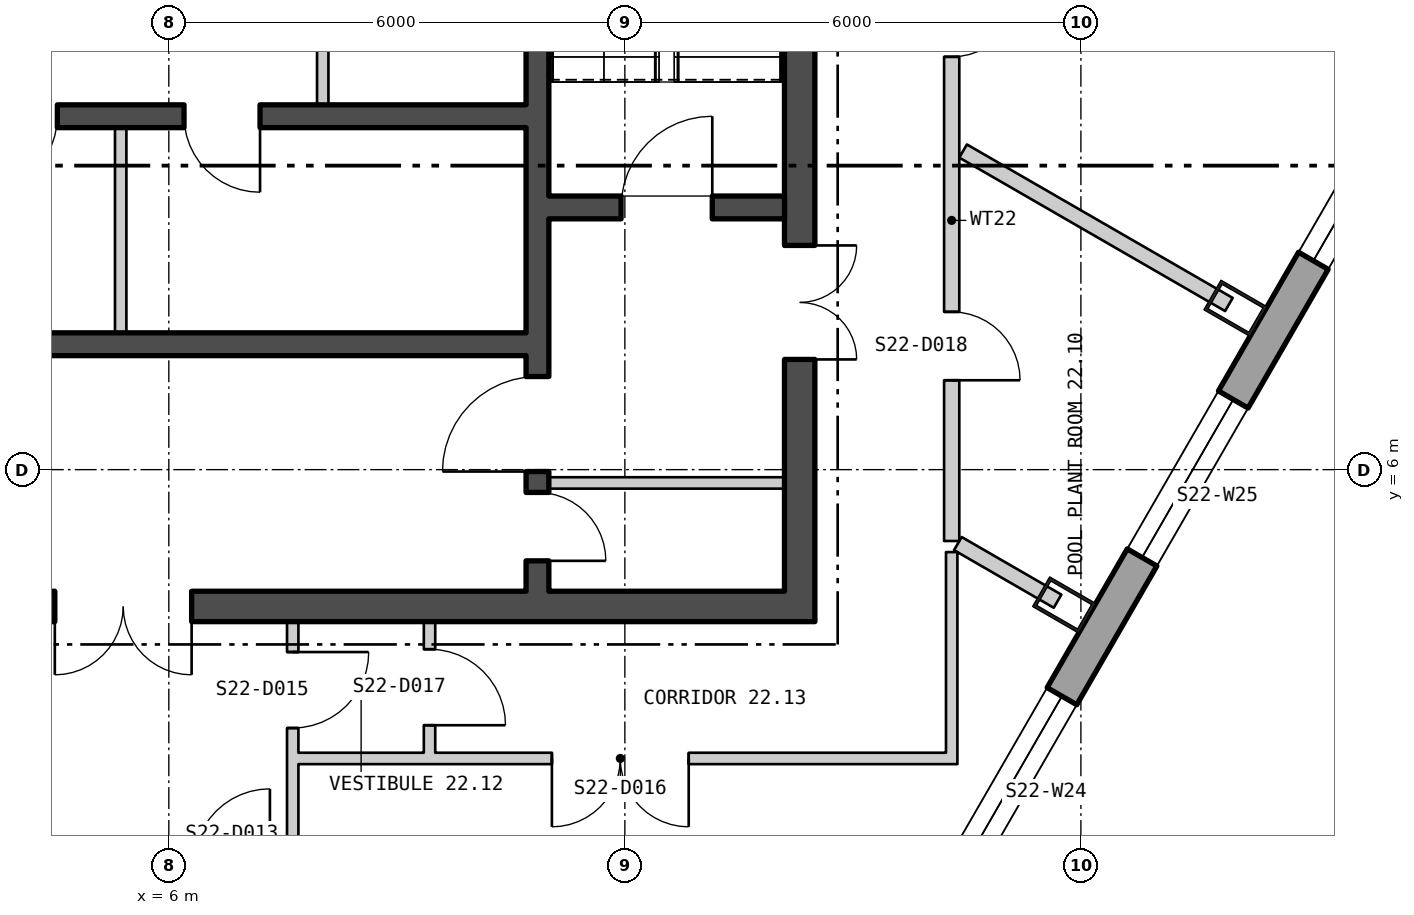
"""IFC4 building model, lengths in metres.
Left out: names, types, materials, properties, quantities, classifications, styles, units other than length and angle.
Written with IfcOpenShell. Run it as: python <this file> out.ifc"""

import sys

from ifc_helpers import new_model, si_unit, direction, frame, frame_2d, origin, origin_2d, place, context, subcontext, project, spatial, polyline, rectangle, hollow_rectangle, outline, extrude, element, fill, save


model = new_model("IFC4")
c1 = context("Model", 3, precision=1e-05, world=origin(), true_north=direction((0.0, 1.0)))
c2 = subcontext(c1, "Body", "Model", "MODEL_VIEW")
j1 = project(units=[si_unit("LENGTHUNIT", "METRE"), si_unit("PLANEANGLEUNIT", "RADIAN")], contexts=[c1])
p1 = place(None, origin())
s1 = spatial("IfcSite", under=j1, at=p1, CompositionType="ELEMENT")
p2 = place(p1, origin())
s2 = spatial("IfcBuilding", under=s1, at=p2, CompositionType="ELEMENT")
p3 = place(p2, frame((0.0, 0.0, 298.2)))
s3 = spatial("IfcBuildingStorey", under=s2, at=p3, CompositionType="ELEMENT", Elevation=298.2)
for number, where, z_axis, x_axis in (
    (1, (17.78, 4.219, 0.0), (0.0, 0.0, 1.0), (0.5, 0.866, 0.0)),
    (2, (20.034, 8.123, 0.0), (0.0, 0.0, 1.0), (0.5, 0.866, 0.0)),
):
    element("IfcColumn", number, at=place(p3, frame(where, z_axis=z_axis, x_axis=x_axis)), inside=s3, PredefinedType="COLUMN", context=c2, shape_type="SweptSolid", body=[
        extrude(hollow_rectangle(XDim=0.45, YDim=0.7, WallThickness=0.04, at=origin_2d()), origin(), (0.0, 0.0, 1.0), 6.0),
    ])
p4 = place(p3, frame((2.335, -23.682, -0.28), z_axis=(0.0, 0.0, 1.0), x_axis=(0.499999764979, 0.866025539474, 0.0)))
e3 = element("IfcWall", 3, at=p4, inside=s3, PredefinedType="SOLIDWALL", context=c2, shape_type="SweptSolid", body=[
    extrude(outline(polyline([(-0.13, -0.225), (45.87, -0.225), (45.61, 0.225), (0.13, 0.225), (-0.13, -0.225)])), origin(), (0.0, 0.0, 1.0), 6.1),
])
p5 = place(p4, frame((1.424, 0.0, 1.18)))
e4 = element("IfcOpeningElement", 4, at=p5, cuts=e3, PredefinedType="OPENING", context=c2, shape_type="SweptSolid", body=[
    extrude(rectangle(XDim=2.4, YDim=4.1, at=frame_2d((1.2, 2.05))), frame((0.0, 0.235, 0.0), z_axis=(0.0, -1.0, 0.0), x_axis=(1.0, 0.0, 0.0)), (0.0, 0.0, 1.0), 0.47),
])
p6 = place(p4, frame((5.893, 0.0, 1.18)))
e5 = element("IfcOpeningElement", 5, at=p6, cuts=e3, PredefinedType="OPENING", context=c2, shape_type="SweptSolid", body=[
    extrude(rectangle(XDim=2.4, YDim=4.1, at=frame_2d((1.2, 2.05))), frame((0.0, 0.235, 0.0), z_axis=(0.0, -1.0, 0.0), x_axis=(1.0, 0.0, 0.0)), (0.0, 0.0, 1.0), 0.47),
])
p7 = place(p4, frame((10.401, 0.0, 1.18)))
e6 = element("IfcOpeningElement", 6, at=p7, cuts=e3, PredefinedType="OPENING", context=c2, shape_type="SweptSolid", body=[
    extrude(rectangle(XDim=2.4, YDim=4.1, at=frame_2d((1.2, 2.05))), frame((0.0, 0.235, 0.0), z_axis=(0.0, -1.0, 0.0), x_axis=(1.0, 0.0, 0.0)), (0.0, 0.0, 1.0), 0.47),
])
p8 = place(p4, frame((14.909, 0.0, 1.18)))
e7 = element("IfcOpeningElement", 7, at=p8, cuts=e3, PredefinedType="OPENING", context=c2, shape_type="SweptSolid", body=[
    extrude(rectangle(XDim=2.4, YDim=4.1, at=frame_2d((1.2, 2.05))), frame((0.0, 0.235, 0.0), z_axis=(0.0, -1.0, 0.0), x_axis=(1.0, 0.0, 0.0)), (0.0, 0.0, 1.0), 0.47),
])
p9 = place(p4, frame((19.716, 0.0, 0.28)))
e8 = element("IfcOpeningElement", 8, at=p9, cuts=e3, PredefinedType="OPENING", context=c2, shape_type="SweptSolid", body=[
    extrude(rectangle(XDim=1.8, YDim=2.4, at=frame_2d((0.9, 1.2))), frame((0.0, 0.235, 0.0), z_axis=(0.0, -1.0, 0.0), x_axis=(1.0, 0.0, 0.0)), (0.0, 0.0, 1.0), 0.47),
])
p10 = place(p4, frame((24.224, 0.0, 0.28)))
e9 = element("IfcOpeningElement", 9, at=p10, cuts=e3, PredefinedType="OPENING", context=c2, shape_type="SweptSolid", body=[
    extrude(rectangle(XDim=1.8, YDim=2.4, at=frame_2d((0.9, 1.2))), frame((0.0, 0.235, 0.0), z_axis=(0.0, -1.0, 0.0), x_axis=(1.0, 0.0, 0.0)), (0.0, 0.0, 1.0), 0.47),
])
p11 = place(p4, frame((28.431, 0.0, 1.18)))
e10 = element("IfcOpeningElement", 10, at=p11, cuts=e3, PredefinedType="OPENING", context=c2, shape_type="SweptSolid", body=[
    extrude(rectangle(XDim=2.4, YDim=4.1, at=frame_2d((1.2, 2.05))), frame((0.0, 0.235, 0.0), z_axis=(0.0, -1.0, 0.0), x_axis=(1.0, 0.0, 0.0)), (0.0, 0.0, 1.0), 0.47),
])
p12 = place(p4, frame((32.939, 0.0, 1.18)))
e11 = element("IfcOpeningElement", 11, at=p12, cuts=e3, PredefinedType="OPENING", context=c2, shape_type="SweptSolid", body=[
    extrude(rectangle(XDim=2.4, YDim=4.1, at=frame_2d((1.2, 2.05))), frame((0.0, 0.235, 0.0), z_axis=(0.0, -1.0, 0.0), x_axis=(1.0, 0.0, 0.0)), (0.0, 0.0, 1.0), 0.47),
])
p13 = place(p4, frame((37.447, 0.0, 1.18)))
e12 = element("IfcOpeningElement", 12, at=p13, cuts=e3, PredefinedType="OPENING", context=c2, shape_type="SweptSolid", body=[
    extrude(rectangle(XDim=2.4, YDim=4.1, at=frame_2d((1.2, 2.05))), frame((0.0, 0.235, 0.0), z_axis=(0.0, -1.0, 0.0), x_axis=(1.0, 0.0, 0.0)), (0.0, 0.0, 1.0), 0.47),
])
p14 = place(p4, frame((41.916, 0.0, 1.18)))
e13 = element("IfcOpeningElement", 13, at=p14, cuts=e3, PredefinedType="OPENING", context=c2, shape_type="SweptSolid", body=[
    extrude(rectangle(XDim=2.4, YDim=4.1, at=frame_2d((1.2, 2.05))), frame((0.0, 0.235, 0.0), z_axis=(0.0, -1.0, 0.0), x_axis=(1.0, 0.0, 0.0)), (0.0, 0.0, 1.0), 0.47),
])
p15 = place(p3, frame((-14.5, 4.2, 0.0), z_axis=(0.0, 0.0, 1.0), x_axis=(1.0, 0.0, 0.0)))
e14 = element("IfcWall", 14, at=p15, inside=s3, PredefinedType="SHEAR", context=c2, shape_type="SweptSolid", body=[
    extrude(rectangle(XDim=29.0, YDim=0.4, at=frame_2d((14.5, 0.0))), origin(), (0.0, 0.0, 1.0), 5.8),
])
p16 = place(p15, frame((9.0, 0.0, 0.0)))
e15 = element("IfcOpeningElement", 15, at=p16, cuts=e14, PredefinedType="OPENING", context=c2, shape_type="SweptSolid", body=[
    extrude(rectangle(XDim=1.8, YDim=2.4, at=frame_2d((0.9, 1.2))), frame((0.0, 0.21, 0.0), z_axis=(0.0, -1.0, 0.0), x_axis=(1.0, 0.0, 0.0)), (0.0, 0.0, 1.0), 0.42),
])
p17 = place(p15, frame((19.0, 0.0, 0.0)))
e16 = element("IfcOpeningElement", 16, at=p17, cuts=e14, PredefinedType="OPENING", context=c2, shape_type="SweptSolid", body=[
    extrude(rectangle(XDim=1.8, YDim=2.4, at=frame_2d((0.9, 1.2))), frame((0.0, 0.21, 0.0), z_axis=(0.0, -1.0, 0.0), x_axis=(1.0, 0.0, 0.0)), (0.0, 0.0, 1.0), 0.42),
])
p18 = place(p3, frame((14.3, 4.4, 0.0), z_axis=(0.0, 0.0, 1.0), x_axis=(0.0, 1.0, 0.0)))
e17 = element("IfcWall", 17, at=p18, inside=s3, PredefinedType="SHEAR", context=c2, shape_type="SweptSolid", body=[
    extrude(rectangle(XDim=13.2, YDim=0.4, at=frame_2d((6.6, 0.0))), origin(), (0.0, 0.0, 1.0), 5.8),
])
p19 = place(p18, frame((3.05, 0.0, 0.0)))
e18 = element("IfcOpeningElement", 18, at=p19, cuts=e17, PredefinedType="OPENING", context=c2, shape_type="SweptSolid", body=[
    extrude(rectangle(XDim=1.5, YDim=2.1, at=frame_2d((0.75, 1.05))), frame((0.0, 0.21, 0.0), z_axis=(0.0, -1.0, 0.0), x_axis=(1.0, 0.0, 0.0)), (0.0, 0.0, 1.0), 0.42),
])
p20 = place(p3, frame((10.85, 4.4, 0.0), z_axis=(0.0, 0.0, 1.0), x_axis=(0.0, 1.0, 0.0)))
e19 = element("IfcWall", 19, at=p20, inside=s3, PredefinedType="SHEAR", context=c2, shape_type="SweptSolid", body=[
    extrude(rectangle(XDim=13.2, YDim=0.3, at=frame_2d((6.6, 0.0))), origin(), (0.0, 0.0, 1.0), 5.8),
])
p21 = place(p20, frame((1.575, 0.0, 0.0)))
e20 = element("IfcOpeningElement", 20, at=p21, cuts=e19, PredefinedType="OPENING", context=c2, shape_type="SweptSolid", body=[
    extrude(rectangle(XDim=1.25, YDim=2.1, at=frame_2d((0.625, 1.05))), frame((0.0, 0.16, 0.0), z_axis=(0.0, -1.0, 0.0), x_axis=(1.0, 0.0, 0.0)), (0.0, 0.0, 1.0), 0.32),
])
p22 = place(p20, frame((0.4, 0.0, 0.0)))
e21 = element("IfcOpeningElement", 21, at=p22, cuts=e19, PredefinedType="OPENING", context=c2, shape_type="SweptSolid", body=[
    extrude(rectangle(XDim=0.9, YDim=2.1, at=frame_2d((0.45, 1.05))), frame((0.0, 0.16, 0.0), z_axis=(0.0, -1.0, 0.0), x_axis=(1.0, 0.0, 0.0)), (0.0, 0.0, 1.0), 0.32),
])
p23 = place(p3, frame((11.0, 9.45, 0.0), z_axis=(0.0, 0.0, 1.0), x_axis=(1.0, 0.0, 0.0)))
e22 = element("IfcWall", 22, at=p23, inside=s3, PredefinedType="SHEAR", context=c2, shape_type="SweptSolid", body=[
    extrude(rectangle(XDim=3.1, YDim=0.3, at=frame_2d((1.55, 0.0))), origin(), (0.0, 0.0, 1.0), 5.8),
])
p24 = place(p23, frame((0.95, 0.0, 0.0)))
e23 = element("IfcOpeningElement", 23, at=p24, cuts=e22, PredefinedType="OPENING", context=c2, shape_type="SweptSolid", body=[
    extrude(rectangle(XDim=1.2, YDim=2.1, at=frame_2d((0.6, 1.05))), frame((0.0, 0.16, 0.0), z_axis=(0.0, -1.0, 0.0), x_axis=(1.0, 0.0, 0.0)), (0.0, 0.0, 1.0), 0.32),
])
p25 = place(p3, frame((2.6, 10.65, 0.0), z_axis=(0.0, 0.0, 1.0), x_axis=(1.0, 0.0, 0.0)))
e24 = element("IfcWall", 24, at=p25, inside=s3, PredefinedType="SHEAR", context=c2, shape_type="SweptSolid", body=[
    extrude(rectangle(XDim=8.1, YDim=0.3, at=frame_2d((4.05, 0.0))), origin(), (0.0, 0.0, 1.0), 5.8),
])
p26 = place(p25, frame((0.933, 0.0, 0.0)))
e25 = element("IfcOpeningElement", 25, at=p26, cuts=e24, PredefinedType="OPENING", context=c2, shape_type="SweptSolid", body=[
    extrude(rectangle(XDim=1.0, YDim=2.1, at=frame_2d((0.5, 1.05))), frame((0.0, 0.16, 0.0), z_axis=(0.0, -1.0, 0.0), x_axis=(1.0, 0.0, 0.0)), (0.0, 0.0, 1.0), 0.32),
])
p27 = place(p25, frame((3.6, 0.0, 0.0)))
e26 = element("IfcOpeningElement", 26, at=p27, cuts=e24, PredefinedType="OPENING", context=c2, shape_type="SweptSolid", body=[
    extrude(rectangle(XDim=1.0, YDim=2.1, at=frame_2d((0.5, 1.05))), frame((0.0, 0.16, 0.0), z_axis=(0.0, -1.0, 0.0), x_axis=(1.0, 0.0, 0.0)), (0.0, 0.0, 1.0), 0.32),
])
p28 = place(p3, frame((2.6, 7.65, 0.0), z_axis=(0.0, 0.0, 1.0), x_axis=(1.0, 0.0, 0.0)))
e27 = element("IfcWall", 27, at=p28, inside=s3, PredefinedType="SHEAR", context=c2, shape_type="SweptSolid", body=[
    extrude(rectangle(XDim=8.1, YDim=0.3, at=frame_2d((4.05, 0.0))), origin(), (0.0, 0.0, 1.0), 5.8),
])
p29 = place(p3, frame((5.367, 7.8, 0.0), z_axis=(0.0, 0.0, 1.0), x_axis=(0.0, 1.0, 0.0)))
e28 = element("IfcWall", 28, at=p29, inside=s3, PredefinedType="PARTITIONING", context=c2, shape_type="SweptSolid", body=[
    extrude(rectangle(XDim=2.7, YDim=0.15, at=frame_2d((1.35, 0.0))), origin(), (0.0, 0.0, 1.0), 5.8),
])
p30 = place(p3, frame((8.025, 10.8, 0.0), z_axis=(0.0, 0.0, 1.0), x_axis=(0.0, 1.0, 0.0)))
e29 = element("IfcWall", 29, at=p30, inside=s3, PredefinedType="PARTITIONING", context=c2, shape_type="SweptSolid", body=[
    extrude(rectangle(XDim=3.6, YDim=0.15, at=frame_2d((1.8, 0.0))), origin(), (0.0, 0.0, 1.0), 5.8),
])
p31 = place(p30, frame((1.175, 0.0, 0.0)))
e30 = element("IfcOpeningElement", 30, at=p31, cuts=e29, PredefinedType="OPENING", context=c2, shape_type="SweptSolid", body=[
    extrude(rectangle(XDim=1.25, YDim=2.1, at=frame_2d((0.625, 1.05))), frame((0.0, 0.085, 0.0), z_axis=(0.0, -1.0, 0.0), x_axis=(1.0, 0.0, 0.0)), (0.0, 0.0, 1.0), 0.17),
])
p32 = place(p3, frame((11.0, 5.825, 0.0), z_axis=(0.0, 0.0, 1.0), x_axis=(1.0, 0.0, 0.0)))
e31 = element("IfcWall", 31, at=p32, inside=s3, PredefinedType="PARTITIONING", context=c2, shape_type="SweptSolid", body=[
    extrude(rectangle(XDim=3.1, YDim=0.15, at=frame_2d((1.55, 0.0))), origin(), (0.0, 0.0, 1.0), 5.8),
])
p33 = place(p3, frame((7.63, -13.675, 0.0), z_axis=(0.0, 0.0, 1.0), x_axis=(0.0, 1.0, 0.0)))
e32 = element("IfcWall", 32, at=p33, inside=s3, PredefinedType="PARTITIONING", context=c2, shape_type="SweptSolid", body=[
    extrude(rectangle(XDim=17.675, YDim=0.15, at=frame_2d((8.838, 0.0))), origin(), (0.0, 0.0, 1.0), 5.8),
])
p34 = place(p33, frame((2.829, 0.0, 0.0)))
e33 = element("IfcOpeningElement", 33, at=p34, cuts=e32, PredefinedType="OPENING", context=c2, shape_type="SweptSolid", body=[
    extrude(rectangle(XDim=1.8, YDim=2.1, at=frame_2d((0.9, 1.05))), frame((0.0, 0.085, 0.0), z_axis=(0.0, -1.0, 0.0), x_axis=(1.0, 0.0, 0.0)), (0.0, 0.0, 1.0), 0.17),
])
p35 = place(p33, frame((16.275, 0.0, 0.0)))
e34 = element("IfcOpeningElement", 34, at=p35, cuts=e32, PredefinedType="OPENING", context=c2, shape_type="SweptSolid", body=[
    extrude(rectangle(XDim=1.0, YDim=2.1, at=frame_2d((0.5, 1.05))), frame((0.0, 0.085, 0.0), z_axis=(0.0, -1.0, 0.0), x_axis=(1.0, 0.0, 0.0)), (0.0, 0.0, 1.0), 0.17),
])
p36 = place(p3, frame((7.705, 2.2, 0.0), z_axis=(0.0, 0.0, 1.0), x_axis=(1.0, 0.0, 0.0)))
e35 = element("IfcWall", 35, at=p36, inside=s3, PredefinedType="PARTITIONING", context=c2, shape_type="SweptSolid", body=[
    extrude(rectangle(XDim=8.67, YDim=0.15, at=frame_2d((4.335, 0.0))), origin(), (0.0, 0.0, 1.0), 5.8),
])
p37 = place(p36, frame((3.335, 0.0, 0.0)))
e36 = element("IfcOpeningElement", 36, at=p37, cuts=e35, PredefinedType="OPENING", context=c2, shape_type="SweptSolid", body=[
    extrude(rectangle(XDim=1.8, YDim=2.1, at=frame_2d((0.9, 1.05))), frame((0.0, 0.085, 0.0), z_axis=(0.0, -1.0, 0.0), x_axis=(1.0, 0.0, 0.0)), (0.0, 0.0, 1.0), 0.17),
])
p38 = place(p3, frame((9.43, 2.275, 0.0), z_axis=(0.0, 0.0, 1.0), x_axis=(0.0, 1.0, 0.0)))
e37 = element("IfcWall", 37, at=p38, inside=s3, PredefinedType="PARTITIONING", context=c2, shape_type="SweptSolid", body=[
    extrude(rectangle(XDim=1.725, YDim=0.15, at=frame_2d((0.863, 0.0))), origin(), (0.0, 0.0, 1.0), 5.8),
])
p39 = place(p38, frame((0.362, 0.0, 0.0)))
e38 = element("IfcOpeningElement", 38, at=p39, cuts=e37, PredefinedType="OPENING", context=c2, shape_type="SweptSolid", body=[
    extrude(rectangle(XDim=1.0, YDim=2.1, at=frame_2d((0.5, 1.05))), frame((0.0, 0.085, 0.0), z_axis=(0.0, -1.0, 0.0), x_axis=(1.0, 0.0, 0.0)), (0.0, 0.0, 1.0), 0.17),
])
p40 = place(p3, frame((16.3, 2.275, 0.0), z_axis=(0.0, 0.0, 1.0), x_axis=(0.0, 1.0, 0.0)))
e39 = element("IfcWall", 39, at=p40, inside=s3, PredefinedType="PARTITIONING", context=c2, shape_type="SweptSolid", body=[
    extrude(rectangle(XDim=2.64, YDim=0.15, at=frame_2d((1.32, 0.0))), origin(), (0.0, 0.0, 1.0), 5.8),
])
p41 = place(p3, frame((16.3, 5.061, 0.0), z_axis=(0.0, 0.0, 1.0), x_axis=(0.0, 1.0, 0.0)))
e40 = element("IfcWall", 40, at=p41, inside=s3, PredefinedType="PARTITIONING", context=c2, shape_type="SweptSolid", body=[
    extrude(rectangle(XDim=8.437, YDim=0.2, at=frame_2d((4.218, 0.0))), origin(), (0.0, 0.0, 1.0), 5.8),
])
p42 = place(p41, frame((2.115, 0.0, 0.0)))
e41 = element("IfcOpeningElement", 41, at=p42, cuts=e40, PredefinedType="OPENING", context=c2, shape_type="SweptSolid", body=[
    extrude(rectangle(XDim=0.9, YDim=2.1, at=frame_2d((0.45, 1.05))), frame((0.0, 0.11, 0.0), z_axis=(0.0, -1.0, 0.0), x_axis=(1.0, 0.0, 0.0)), (0.0, 0.0, 1.0), 0.22),
])
p43 = place(p41, frame((6.371, 0.0, 0.0)))
e42 = element("IfcOpeningElement", 42, at=p43, cuts=e40, PredefinedType="OPENING", context=c2, shape_type="SweptSolid", body=[
    extrude(rectangle(XDim=0.9, YDim=2.1, at=frame_2d((0.45, 1.05))), frame((0.0, 0.11, 0.0), z_axis=(0.0, -1.0, 0.0), x_axis=(1.0, 0.0, 0.0)), (0.0, 0.0, 1.0), 0.22),
])
p44 = place(p3, frame((16.381, 5.027, 0.0), z_axis=(0.0, 0.0, 1.0), x_axis=(0.865877778751, -0.500255606931, 0.0)))
e43 = element("IfcWall", 43, at=p44, inside=s3, PredefinedType="PARTITIONING", context=c2, shape_type="SweptSolid", body=[
    extrude(rectangle(XDim=1.515, YDim=0.2, at=frame_2d((0.758, 0.0))), origin(), (0.0, 0.0, 1.0), 5.8),
])
p45 = place(p3, frame((16.45, 10.192, 0.0), z_axis=(0.0, 0.0, 1.0), x_axis=(0.866024748725, -0.500001134594, 0.0)))
e44 = element("IfcWall", 44, at=p45, inside=s3, PredefinedType="PARTITIONING", context=c2, shape_type="SweptSolid", body=[
    extrude(rectangle(XDim=4.038, YDim=0.2, at=frame_2d((2.019, 0.0))), origin(), (0.0, 0.0, 1.0), 5.8),
])
p46 = place(p11, origin())
e45 = element("IfcWindow", 45, at=p46, inside=s3, PartitioningType="SINGLE_PANEL", PredefinedType="WINDOW", context=c2, shape_type="SweptSolid", body=[
    extrude(rectangle(XDim=2.4, YDim=4.1, at=frame_2d((1.2, 2.05))), frame((0.0, 0.105, 0.0), z_axis=(0.0, -1.0, 0.0), x_axis=(1.0, 0.0, 0.0)), (0.0, 0.0, 1.0), 0.06),
])
fill(e10, e45)
p47 = place(p12, origin())
e46 = element("IfcWindow", 46, at=p47, inside=s3, PartitioningType="SINGLE_PANEL", PredefinedType="WINDOW", context=c2, shape_type="SweptSolid", body=[
    extrude(rectangle(XDim=2.4, YDim=4.1, at=frame_2d((1.2, 2.05))), frame((0.0, 0.105, 0.0), z_axis=(0.0, -1.0, 0.0), x_axis=(1.0, 0.0, 0.0)), (0.0, 0.0, 1.0), 0.06),
])
fill(e11, e46)
p48 = place(p13, origin())
e47 = element("IfcWindow", 47, at=p48, inside=s3, PartitioningType="SINGLE_PANEL", PredefinedType="WINDOW", context=c2, shape_type="SweptSolid", body=[
    extrude(rectangle(XDim=2.4, YDim=4.1, at=frame_2d((1.2, 2.05))), frame((0.0, 0.105, 0.0), z_axis=(0.0, -1.0, 0.0), x_axis=(1.0, 0.0, 0.0)), (0.0, 0.0, 1.0), 0.06),
])
fill(e12, e47)
p49 = place(p26, origin())
e48 = element("IfcDoor", 48, at=p49, inside=s3, OperationType="SINGLE_SWING_LEFT", PredefinedType="DOOR", context=c2, shape_type="SweptSolid", body=[
    extrude(rectangle(XDim=1.0, YDim=2.1, at=frame_2d((0.5, 1.05))), frame((0.0, 0.025, 0.0), z_axis=(0.0, -1.0, 0.0), x_axis=(1.0, 0.0, 0.0)), (0.0, 0.0, 1.0), 0.05),
])
fill(e25, e48)
p50 = place(p27, origin())
e49 = element("IfcDoor", 49, at=p50, inside=s3, OperationType="SINGLE_SWING_RIGHT", PredefinedType="DOOR", context=c2, shape_type="SweptSolid", body=[
    extrude(rectangle(XDim=1.0, YDim=2.1, at=frame_2d((0.5, 1.05))), frame((0.0, 0.025, 0.0), z_axis=(0.0, -1.0, 0.0), x_axis=(1.0, 0.0, 0.0)), (0.0, 0.0, 1.0), 0.05),
])
fill(e26, e49)
p51 = place(p24, origin())
e50 = element("IfcDoor", 50, at=p51, inside=s3, OperationType="SINGLE_SWING_LEFT", PredefinedType="DOOR", context=c2, shape_type="SweptSolid", body=[
    extrude(rectangle(XDim=1.2, YDim=2.1, at=frame_2d((0.6, 1.05))), frame((0.0, 0.025, 0.0), z_axis=(0.0, -1.0, 0.0), x_axis=(1.0, 0.0, 0.0)), (0.0, 0.0, 1.0), 0.05),
])
fill(e23, e50)
p52 = place(p21, origin())
e51 = element("IfcDoor", 51, at=p52, inside=s3, OperationType="SINGLE_SWING_RIGHT", PredefinedType="DOOR", context=c2, shape_type="SweptSolid", body=[
    extrude(rectangle(XDim=1.25, YDim=2.1, at=frame_2d((0.625, 1.05))), frame((0.0, 0.025, 0.0), z_axis=(0.0, -1.0, 0.0), x_axis=(1.0, 0.0, 0.0)), (0.0, 0.0, 1.0), 0.05),
])
fill(e20, e51)
p53 = place(p19, origin())
e52 = element("IfcDoor", 52, at=p53, inside=s3, OperationType="DOUBLE_DOOR_SINGLE_SWING", PredefinedType="DOOR", context=c2, shape_type="SweptSolid", body=[
    extrude(rectangle(XDim=1.5, YDim=2.1, at=frame_2d((0.75, 1.05))), frame((0.0, 0.025, 0.0), z_axis=(0.0, -1.0, 0.0), x_axis=(1.0, 0.0, 0.0)), (0.0, 0.0, 1.0), 0.05),
])
fill(e18, e52)
p54 = place(p22, origin())
e53 = element("IfcDoor", 53, at=p54, inside=s3, OperationType="SINGLE_SWING_LEFT", PredefinedType="DOOR", context=c2, shape_type="SweptSolid", body=[
    extrude(rectangle(XDim=0.9, YDim=2.1, at=frame_2d((0.45, 1.05))), frame((0.0, 0.025, 0.0), z_axis=(0.0, -1.0, 0.0), x_axis=(1.0, 0.0, 0.0)), (0.0, 0.0, 1.0), 0.05),
])
fill(e21, e53)
p55 = place(p17, origin())
e54 = element("IfcDoor", 54, at=p55, inside=s3, OperationType="DOUBLE_DOOR_SINGLE_SWING", PredefinedType="DOOR", context=c2, shape_type="SweptSolid", body=[
    extrude(rectangle(XDim=1.8, YDim=2.4, at=frame_2d((0.9, 1.2))), frame((0.0, 0.025, 0.0), z_axis=(0.0, -1.0, 0.0), x_axis=(1.0, 0.0, 0.0)), (0.0, 0.0, 1.0), 0.05),
])
fill(e16, e54)
p56 = place(p35, origin())
e55 = element("IfcDoor", 55, at=p56, inside=s3, OperationType="SINGLE_SWING_RIGHT", PredefinedType="DOOR", context=c2, shape_type="SweptSolid", body=[
    extrude(rectangle(XDim=1.0, YDim=2.1, at=frame_2d((0.5, 1.05))), frame((0.0, 0.025, 0.0), z_axis=(0.0, -1.0, 0.0), x_axis=(1.0, 0.0, 0.0)), (0.0, 0.0, 1.0), 0.05),
])
fill(e34, e55)
p57 = place(p37, origin())
e56 = element("IfcDoor", 56, at=p57, inside=s3, OperationType="DOUBLE_DOOR_SINGLE_SWING", PredefinedType="DOOR", context=c2, shape_type="SweptSolid", body=[
    extrude(rectangle(XDim=1.8, YDim=2.1, at=frame_2d((0.9, 1.05))), frame((0.0, 0.025, 0.0), z_axis=(0.0, -1.0, 0.0), x_axis=(1.0, 0.0, 0.0)), (0.0, 0.0, 1.0), 0.05),
])
fill(e36, e56)
p58 = place(p39, origin())
e57 = element("IfcDoor", 57, at=p58, inside=s3, OperationType="SINGLE_SWING_LEFT", PredefinedType="DOOR", context=c2, shape_type="SweptSolid", body=[
    extrude(rectangle(XDim=1.0, YDim=2.1, at=frame_2d((0.5, 1.05))), frame((0.0, 0.025, 0.0), z_axis=(0.0, -1.0, 0.0), x_axis=(1.0, 0.0, 0.0)), (0.0, 0.0, 1.0), 0.05),
])
fill(e38, e57)
p59 = place(p42, origin())
e58 = element("IfcDoor", 58, at=p59, inside=s3, OperationType="SINGLE_SWING_LEFT", PredefinedType="DOOR", context=c2, shape_type="SweptSolid", body=[
    extrude(rectangle(XDim=0.9, YDim=2.1, at=frame_2d((0.45, 1.05))), frame((0.0, 0.025, 0.0), z_axis=(0.0, -1.0, 0.0), x_axis=(1.0, 0.0, 0.0)), (0.0, 0.0, 1.0), 0.05),
])
fill(e41, e58)
p60 = place(p43, origin())
e59 = element("IfcDoor", 59, at=p60, inside=s3, OperationType="SINGLE_SWING_RIGHT", PredefinedType="DOOR", context=c2, shape_type="SweptSolid", body=[
    extrude(rectangle(XDim=0.9, YDim=2.1, at=frame_2d((0.45, 1.05))), frame((0.0, 0.025, 0.0), z_axis=(0.0, -1.0, 0.0), x_axis=(1.0, 0.0, 0.0)), (0.0, 0.0, 1.0), 0.05),
])
fill(e42, e59)
save(model, sys.argv[1])
